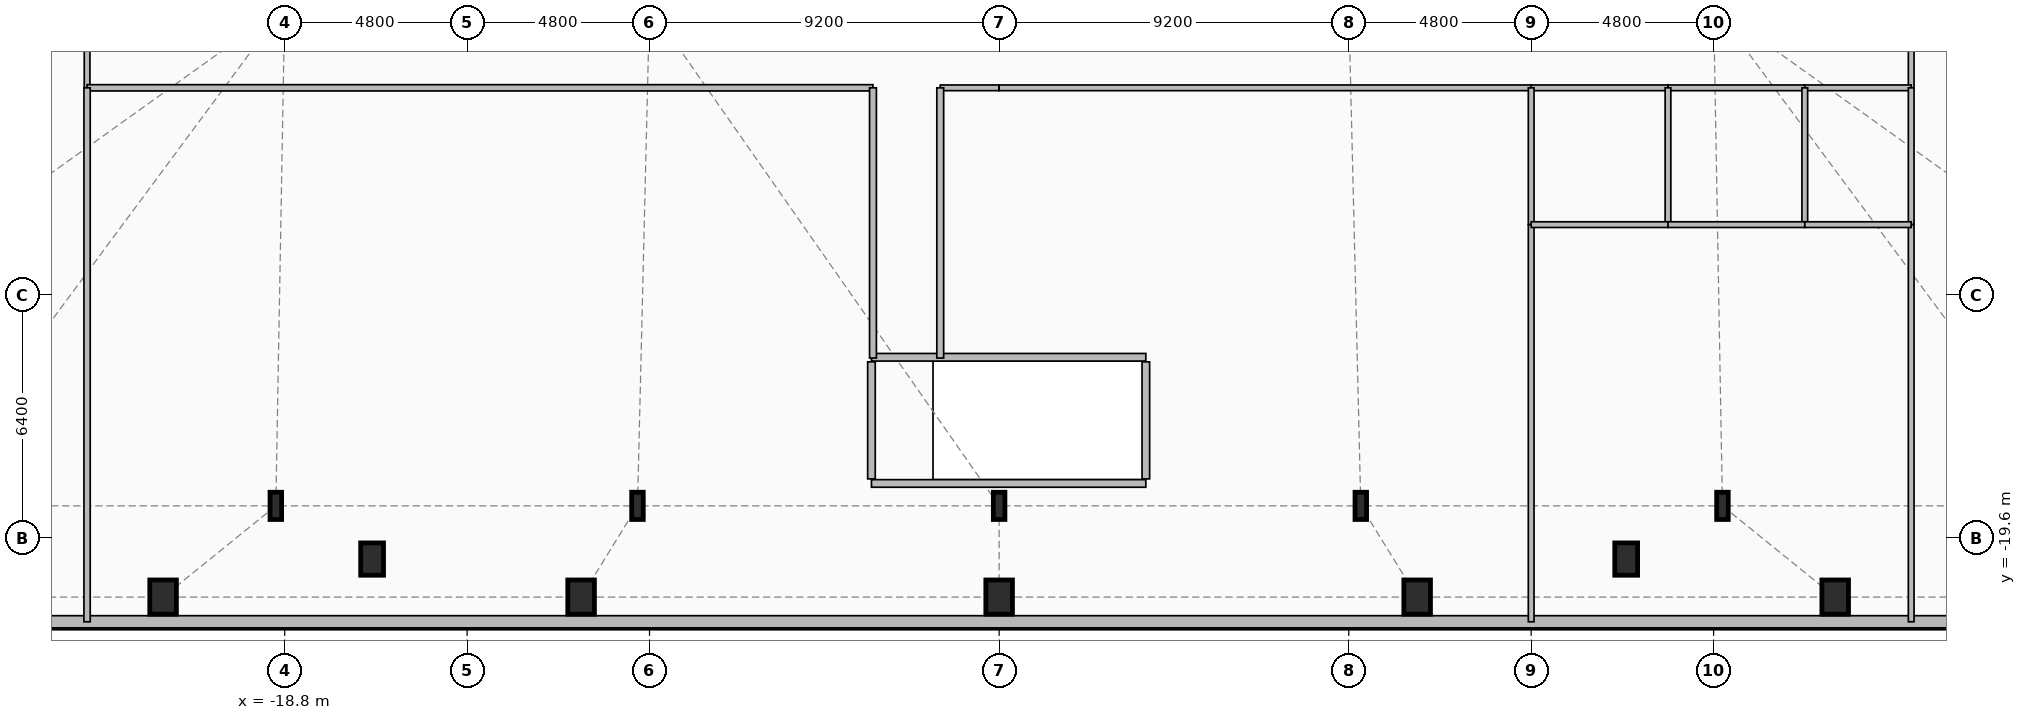
"""IFC4 building model, lengths in metres.
Left out: names, types, materials, properties, quantities, classifications, styles, units other than length and angle.
Written with IfcOpenShell. Run it as: python <this file> out.ifc"""

import sys

from ifc_helpers import new_model, si_unit, direction, frame, frame_2d, origin, origin_2d, place, context, subcontext, project, spatial, rectangle, i_section, extrude, element, fill, save


model = new_model("IFC4")
c1 = context("Model", 3, precision=1e-05, world=origin(), true_north=direction((0.0, 1.0)))
c2 = subcontext(c1, "Body", "Model", "MODEL_VIEW")
j1 = project(units=[si_unit("LENGTHUNIT", "METRE"), si_unit("PLANEANGLEUNIT", "RADIAN")], contexts=[c1])
p1 = place(None, origin())
s1 = spatial("IfcSite", under=j1, at=p1, CompositionType="ELEMENT")
p2 = place(p1, origin())
s2 = spatial("IfcBuilding", under=s1, at=p2, CompositionType="ELEMENT")
p3 = place(p2, frame((0.0, 0.0, 22.5)))
s3 = spatial("IfcBuildingStorey", under=s2, at=p3, CompositionType="ELEMENT", Elevation=22.5)
for number, where, z_axis, x_axis in (
    (1, (-22.0, -21.15, 0.0), (0.0, 0.0, 1.0), (1.0, 0.0, 0.0)),
    (2, (-11.0, -21.15, 0.0), (0.0, 0.0, 1.0), (1.0, 0.0, 0.0)),
    (3, (0.0, -21.15, 0.0), (0.0, 0.0, 1.0), (1.0, 0.0, 0.0)),
    (4, (11.0, -21.15, 0.0), (0.0, 0.0, 1.0), (1.0, 0.0, 0.0)),
    (5, (22.0, -21.15, 0.0), (0.0, 0.0, 1.0), (1.0, 0.0, 0.0)),
):
    element("IfcColumn", number, at=place(p3, frame(where, z_axis=z_axis, x_axis=x_axis)), inside=s3, PredefinedType="COLUMN", context=c2, shape_type="SweptSolid", body=[
        extrude(rectangle(XDim=0.7, YDim=0.9, at=origin_2d()), origin(), (0.0, 0.0, 1.0), 4.5),
    ])
for number, where, z_axis, x_axis in (
    (6, (-16.5, -20.15, 0.0), (0.0, 0.0, 1.0), (1.0, 0.0, 0.0)),
    (7, (16.5, -20.15, 0.0), (0.0, 0.0, 1.0), (1.0, 0.0, 0.0)),
):
    element("IfcColumn", number, at=place(p3, frame(where, z_axis=z_axis, x_axis=x_axis)), inside=s3, PredefinedType="PILASTER", context=c2, shape_type="SweptSolid", body=[
        extrude(rectangle(XDim=0.6, YDim=0.85, at=origin_2d()), origin(), (0.0, 0.0, 1.0), 4.5),
    ])
for number, where, z_axis, x_axis in (
    (8, (-19.033, -18.75, 0.0), (0.0, 0.0, 1.0), (1.0, 0.0, 0.0)),
    (9, (-9.517, -18.75, 0.0), (0.0, 0.0, 1.0), (1.0, 0.0, 0.0)),
    (10, (0.0, -18.75, 0.0), (0.0, 0.0, 1.0), (1.0, 0.0, 0.0)),
    (11, (9.517, -18.75, 0.0), (0.0, 0.0, 1.0), (1.0, 0.0, 0.0)),
    (12, (19.033, -18.75, 0.0), (0.0, 0.0, 1.0), (1.0, 0.0, 0.0)),
):
    element("IfcColumn", number, at=place(p3, frame(where, z_axis=z_axis, x_axis=x_axis)), inside=s3, PredefinedType="COLUMN", context=c2, shape_type="SweptSolid", body=[
        extrude(i_section(OverallWidth=0.304, OverallDepth=0.716, WebThickness=0.021, FlangeThickness=0.04, FilletRadius=0.027, at=origin_2d()), origin(), (0.0, 0.0, 1.0), 4.5),
    ])
p4 = place(p3, frame((36.8, -21.8, 0.0), z_axis=(0.0, 0.0, 1.0), x_axis=(-1.0, 0.0, 0.0)))
e13 = element("IfcWall", 13, at=p4, inside=s3, PredefinedType="SOLIDWALL", context=c2, shape_type="SweptSolid", body=[
    extrude(rectangle(XDim=73.6, YDim=0.32, at=frame_2d((36.8, 0.0))), origin(), (0.0, 0.0, 1.0), 4.16),
])
p5 = place(p4, frame((1.079, 0.0, 0.85)))
e14 = element("IfcOpeningElement", 14, at=p5, cuts=e13, PredefinedType="OPENING", context=c2, shape_type="SweptSolid", body=[
    extrude(rectangle(XDim=2.3, YDim=2.4, at=frame_2d((1.15, 1.2))), frame((0.0, 0.17, 0.0), z_axis=(0.0, -1.0, 0.0), x_axis=(1.0, 0.0, 0.0)), (0.0, 0.0, 1.0), 0.34),
])
p6 = place(p4, frame((8.431, 0.0, 0.85)))
e15 = element("IfcOpeningElement", 15, at=p6, cuts=e13, PredefinedType="OPENING", context=c2, shape_type="SweptSolid", body=[
    extrude(rectangle(XDim=2.6, YDim=2.4, at=frame_2d((1.3, 1.2))), frame((0.0, 0.17, 0.0), z_axis=(0.0, -1.0, 0.0), x_axis=(1.0, 0.0, 0.0)), (0.0, 0.0, 1.0), 0.34),
])
p7 = place(p4, frame((29.293, 0.0, 0.85)))
e16 = element("IfcOpeningElement", 16, at=p7, cuts=e13, PredefinedType="OPENING", context=c2, shape_type="SweptSolid", body=[
    extrude(rectangle(XDim=2.6, YDim=2.4, at=frame_2d((1.3, 1.2))), frame((0.0, 0.17, 0.0), z_axis=(0.0, -1.0, 0.0), x_axis=(1.0, 0.0, 0.0)), (0.0, 0.0, 1.0), 0.34),
])
p8 = place(p4, frame((49.195, 0.0, 0.85)))
e17 = element("IfcOpeningElement", 17, at=p8, cuts=e13, PredefinedType="OPENING", context=c2, shape_type="SweptSolid", body=[
    extrude(rectangle(XDim=2.6, YDim=2.4, at=frame_2d((1.3, 1.2))), frame((0.0, 0.17, 0.0), z_axis=(0.0, -1.0, 0.0), x_axis=(1.0, 0.0, 0.0)), (0.0, 0.0, 1.0), 0.34),
])
p9 = place(p4, frame((62.649, 0.0, 0.85)))
e18 = element("IfcOpeningElement", 18, at=p9, cuts=e13, PredefinedType="OPENING", context=c2, shape_type="SweptSolid", body=[
    extrude(rectangle(XDim=2.6, YDim=2.4, at=frame_2d((1.3, 1.2))), frame((0.0, 0.17, 0.0), z_axis=(0.0, -1.0, 0.0), x_axis=(1.0, 0.0, 0.0)), (0.0, 0.0, 1.0), 0.34),
])
p10 = place(p4, frame((70.301, 0.0, 0.85)))
e19 = element("IfcOpeningElement", 19, at=p10, cuts=e13, PredefinedType="OPENING", context=c2, shape_type="SweptSolid", body=[
    extrude(rectangle(XDim=2.3, YDim=2.4, at=frame_2d((1.15, 1.2))), frame((0.0, 0.17, 0.0), z_axis=(0.0, -1.0, 0.0), x_axis=(1.0, 0.0, 0.0)), (0.0, 0.0, 1.0), 0.34),
])
p11 = place(p3, frame((-3.36, -14.84, 0.0), z_axis=(0.0, 0.0, 1.0), x_axis=(1.0, 0.0, 0.0)))
e20 = element("IfcWall", 20, at=p11, inside=s3, PredefinedType="SHEAR", context=c2, shape_type="SweptSolid", body=[
    extrude(rectangle(XDim=7.22, YDim=0.2, at=frame_2d((3.61, 0.0))), origin(), (0.0, 0.0, 1.0), 4.16),
])
p12 = place(p11, frame((0.31, 0.0, 0.0)))
e21 = element("IfcOpeningElement", 21, at=p12, cuts=e20, PredefinedType="OPENING", context=c2, shape_type="SweptSolid", body=[
    extrude(rectangle(XDim=1.1, YDim=2.15, at=frame_2d((0.55, 1.075))), frame((0.0, 0.11, 0.0), z_axis=(0.0, -1.0, 0.0), x_axis=(1.0, 0.0, 0.0)), (0.0, 0.0, 1.0), 0.22),
])
p13 = place(p3, frame((-3.36, -18.16, 0.0), z_axis=(0.0, 0.0, 1.0), x_axis=(1.0, 0.0, 0.0)))
e22 = element("IfcWall", 22, at=p13, inside=s3, PredefinedType="SHEAR", context=c2, shape_type="SweptSolid", body=[
    extrude(rectangle(XDim=7.22, YDim=0.2, at=frame_2d((3.61, 0.0))), origin(), (0.0, 0.0, 1.0), 4.16),
])
for number, where, z_axis, x_axis in (
    (23, (-3.36, -18.04, 0.0), (0.0, 0.0, 1.0), (0.0, 1.0, 0.0)),
    (24, (3.86, -18.04, 0.0), (0.0, 0.0, 1.0), (0.0, 1.0, 0.0)),
):
    element("IfcWall", number, at=place(p3, frame(where, z_axis=z_axis, x_axis=x_axis)), inside=s3, PredefinedType="SHEAR", context=c2, shape_type="SweptSolid", body=[
        extrude(rectangle(XDim=3.08, YDim=0.2, at=frame_2d((1.54, 0.0))), origin(), (0.0, 0.0, 1.0), 4.16),
    ])
p14 = place(p3, frame((-24.0, -7.75, 0.0), z_axis=(0.0, 0.0, 1.0), x_axis=(0.0, 1.0, 0.0)))
e25 = element("IfcWall", 25, at=p14, inside=s3, PredefinedType="PARTITIONING", context=c2, shape_type="SweptSolid", body=[
    extrude(rectangle(XDim=2.15, YDim=0.15, at=frame_2d((1.075, 0.0))), origin(), (0.0, 0.0, 1.0), 4.16),
])
p15 = place(p14, frame((0.625, 0.0, 0.0)))
e26 = element("IfcOpeningElement", 26, at=p15, cuts=e25, PredefinedType="OPENING", context=c2, shape_type="SweptSolid", body=[
    extrude(rectangle(XDim=0.9, YDim=2.1, at=frame_2d((0.45, 1.05))), frame((0.0, 0.085, 0.0), z_axis=(0.0, -1.0, 0.0), x_axis=(1.0, 0.0, 0.0)), (0.0, 0.0, 1.0), 0.17),
])
p16 = place(p3, frame((-3.32, -7.75, 0.0), z_axis=(0.0, 0.0, 1.0), x_axis=(-1.0, 0.0, 0.0)))
e27 = element("IfcWall", 27, at=p16, inside=s3, PredefinedType="PARTITIONING", context=c2, shape_type="SweptSolid", body=[
    extrude(rectangle(XDim=20.68, YDim=0.165, at=frame_2d((10.34, 0.0))), origin(), (0.0, 0.0, 1.0), 4.16),
])
p17 = place(p16, frame((9.64, 0.0, 0.0)))
e28 = element("IfcOpeningElement", 28, at=p17, cuts=e27, PredefinedType="OPENING", context=c2, shape_type="SweptSolid", body=[
    extrude(rectangle(XDim=1.4, YDim=2.3, at=frame_2d((0.7, 1.15))), frame((0.0, 0.093, 0.0), z_axis=(0.0, -1.0, 0.0), x_axis=(1.0, 0.0, 0.0)), (0.0, 0.0, 1.0), 0.185),
])
p18 = place(p3, frame((0.0, -7.75, 0.0), z_axis=(0.0, 0.0, 1.0), x_axis=(-1.0, 0.0, 0.0)))
e29 = element("IfcWall", 29, at=p18, inside=s3, PredefinedType="PARTITIONING", context=c2, shape_type="SweptSolid", body=[
    extrude(rectangle(XDim=1.55, YDim=0.15, at=frame_2d((0.775, 0.0))), origin(), (0.0, 0.0, 1.0), 4.16),
])
p19 = place(p3, frame((24.0, -5.6, 0.0), z_axis=(0.0, 0.0, 1.0), x_axis=(0.0, -1.0, 0.0)))
e30 = element("IfcWall", 30, at=p19, inside=s3, PredefinedType="PARTITIONING", context=c2, shape_type="SweptSolid", body=[
    extrude(rectangle(XDim=2.15, YDim=0.15, at=frame_2d((1.075, 0.0))), origin(), (0.0, 0.0, 1.0), 4.16),
])
p20 = place(p19, frame((0.625, 0.0, 0.0)))
e31 = element("IfcOpeningElement", 31, at=p20, cuts=e30, PredefinedType="OPENING", context=c2, shape_type="SweptSolid", body=[
    extrude(rectangle(XDim=0.9, YDim=2.1, at=frame_2d((0.45, 1.05))), frame((0.0, 0.085, 0.0), z_axis=(0.0, -1.0, 0.0), x_axis=(1.0, 0.0, 0.0)), (0.0, 0.0, 1.0), 0.17),
])
p21 = place(p3, frame((14.0, -7.75, 0.0), z_axis=(0.0, 0.0, 1.0), x_axis=(-1.0, 0.0, 0.0)))
e32 = element("IfcWall", 32, at=p21, inside=s3, PredefinedType="PARTITIONING", context=c2, shape_type="SweptSolid", body=[
    extrude(rectangle(XDim=14.0, YDim=0.15, at=frame_2d((7.0, 0.0))), origin(), (0.0, 0.0, 1.0), 4.16),
])
p22 = place(p21, frame((10.59, 0.0, 0.0)))
e33 = element("IfcOpeningElement", 33, at=p22, cuts=e32, PredefinedType="OPENING", context=c2, shape_type="SweptSolid", body=[
    extrude(rectangle(XDim=1.4, YDim=2.3, at=frame_2d((0.7, 1.15))), frame((0.0, 0.085, 0.0), z_axis=(0.0, -1.0, 0.0), x_axis=(1.0, 0.0, 0.0)), (0.0, 0.0, 1.0), 0.17),
])
p23 = place(p3, frame((17.6, -7.75, 0.0), z_axis=(0.0, 0.0, 1.0), x_axis=(-1.0, 0.0, 0.0)))
e34 = element("IfcWall", 34, at=p23, inside=s3, PredefinedType="PLUMBINGWALL", context=c2, shape_type="SweptSolid", body=[
    extrude(rectangle(XDim=3.6, YDim=0.15, at=frame_2d((1.8, 0.0))), origin(), (0.0, 0.0, 1.0), 4.16),
])
p24 = place(p23, frame((1.927, 0.0, 0.0)))
e35 = element("IfcOpeningElement", 35, at=p24, cuts=e34, PredefinedType="OPENING", context=c2, shape_type="SweptSolid", body=[
    extrude(rectangle(XDim=0.9, YDim=2.1, at=frame_2d((0.45, 1.05))), frame((0.0, 0.085, 0.0), z_axis=(0.0, -1.0, 0.0), x_axis=(1.0, 0.0, 0.0)), (0.0, 0.0, 1.0), 0.17),
])
p25 = place(p3, frame((21.2, -7.75, 0.0), z_axis=(0.0, 0.0, 1.0), x_axis=(-1.0, 0.0, 0.0)))
e36 = element("IfcWall", 36, at=p25, inside=s3, PredefinedType="PLUMBINGWALL", context=c2, shape_type="SweptSolid", body=[
    extrude(rectangle(XDim=3.6, YDim=0.15, at=frame_2d((1.8, 0.0))), origin(), (0.0, 0.0, 1.0), 4.16),
])
p26 = place(p25, frame((0.772, 0.0, 0.0)))
e37 = element("IfcOpeningElement", 37, at=p26, cuts=e36, PredefinedType="OPENING", context=c2, shape_type="SweptSolid", body=[
    extrude(rectangle(XDim=0.9, YDim=2.1, at=frame_2d((0.45, 1.05))), frame((0.0, 0.085, 0.0), z_axis=(0.0, -1.0, 0.0), x_axis=(1.0, 0.0, 0.0)), (0.0, 0.0, 1.0), 0.17),
])
p27 = place(p3, frame((24.0, -7.75, 0.0), z_axis=(0.0, 0.0, 1.0), x_axis=(-1.0, 0.0, 0.0)))
e38 = element("IfcWall", 38, at=p27, inside=s3, PredefinedType="PARTITIONING", context=c2, shape_type="SweptSolid", body=[
    extrude(rectangle(XDim=2.8, YDim=0.15, at=frame_2d((1.4, 0.0))), origin(), (0.0, 0.0, 1.0), 4.16),
])
p28 = place(p27, frame((0.666, 0.0, 0.0)))
e39 = element("IfcOpeningElement", 39, at=p28, cuts=e38, PredefinedType="OPENING", context=c2, shape_type="SweptSolid", body=[
    extrude(rectangle(XDim=0.95, YDim=2.1, at=frame_2d((0.475, 1.05))), frame((0.0, 0.085, 0.0), z_axis=(0.0, -1.0, 0.0), x_axis=(1.0, 0.0, 0.0)), (0.0, 0.0, 1.0), 0.17),
])
for number, where, z_axis, x_axis in (
    (40, (-3.32, -14.86, 0.0), (0.0, 0.0, 1.0), (0.0, 1.0, 0.0)),
    (41, (-1.55, -7.75, 0.0), (0.0, 0.0, 1.0), (0.0, -1.0, 0.0)),
):
    element("IfcWall", number, at=place(p3, frame(where, z_axis=z_axis, x_axis=x_axis)), inside=s3, PredefinedType="PARTITIONING", context=c2, shape_type="SweptSolid", body=[
        extrude(rectangle(XDim=7.11, YDim=0.18, at=frame_2d((3.555, 0.0))), origin(), (0.0, 0.0, 1.0), 4.16),
    ])
p29 = place(p3, frame((-24.0, -7.75, 0.0), z_axis=(0.0, 0.0, 1.0), x_axis=(0.0, -1.0, 0.0)))
e42 = element("IfcWall", 42, at=p29, inside=s3, PredefinedType="PARTITIONING", context=c2, shape_type="SweptSolid", body=[
    extrude(rectangle(XDim=14.05, YDim=0.165, at=frame_2d((7.025, 0.0))), origin(), (0.0, 0.0, 1.0), 4.16),
])
p30 = place(p3, frame((24.0, -11.35, 0.0), z_axis=(0.0, 0.0, 1.0), x_axis=(0.0, 1.0, 0.0)))
e43 = element("IfcWall", 43, at=p30, inside=s3, PredefinedType="PARTITIONING", context=c2, shape_type="SweptSolid", body=[
    extrude(rectangle(XDim=3.6, YDim=0.15, at=frame_2d((1.8, 0.0))), origin(), (0.0, 0.0, 1.0), 4.16),
])
p31 = place(p3, frame((24.0, -21.8, 0.0), z_axis=(0.0, 0.0, 1.0), x_axis=(0.0, 1.0, 0.0)))
e44 = element("IfcWall", 44, at=p31, inside=s3, PredefinedType="PARTITIONING", context=c2, shape_type="SweptSolid", body=[
    extrude(rectangle(XDim=10.45, YDim=0.15, at=frame_2d((5.225, 0.0))), origin(), (0.0, 0.0, 1.0), 4.16),
])
p32 = place(p3, frame((14.0, -7.75, 0.0), z_axis=(0.0, 0.0, 1.0), x_axis=(0.0, -1.0, 0.0)))
e45 = element("IfcWall", 45, at=p32, inside=s3, PredefinedType="PLUMBINGWALL", context=c2, shape_type="SweptSolid", body=[
    extrude(rectangle(XDim=3.6, YDim=0.15, at=frame_2d((1.8, 0.0))), origin(), (0.0, 0.0, 1.0), 4.16),
])
p33 = place(p3, frame((14.0, -11.35, 0.0), z_axis=(0.0, 0.0, 1.0), x_axis=(0.0, -1.0, 0.0)))
e46 = element("IfcWall", 46, at=p33, inside=s3, PredefinedType="PARTITIONING", context=c2, shape_type="SweptSolid", body=[
    extrude(rectangle(XDim=10.45, YDim=0.15, at=frame_2d((5.225, 0.0))), origin(), (0.0, 0.0, 1.0), 4.16),
])
for number, where, z_axis, x_axis in (
    (47, (17.6, -7.75, 0.0), (0.0, 0.0, 1.0), (0.0, -1.0, 0.0)),
    (48, (17.6, -11.35, 0.0), (0.0, 0.0, 1.0), (-1.0, 0.0, 0.0)),
    (49, (21.2, -7.75, 0.0), (0.0, 0.0, 1.0), (0.0, -1.0, 0.0)),
):
    element("IfcWall", number, at=place(p3, frame(where, z_axis=z_axis, x_axis=x_axis)), inside=s3, PredefinedType="PLUMBINGWALL", context=c2, shape_type="SweptSolid", body=[
        extrude(rectangle(XDim=3.6, YDim=0.15, at=frame_2d((1.8, 0.0))), origin(), (0.0, 0.0, 1.0), 4.16),
    ])
p34 = place(p3, frame((21.2, -11.35, 0.0), z_axis=(0.0, 0.0, 1.0), x_axis=(-1.0, 0.0, 0.0)))
e50 = element("IfcWall", 50, at=p34, inside=s3, PredefinedType="PLUMBINGWALL", context=c2, shape_type="SweptSolid", body=[
    extrude(rectangle(XDim=3.6, YDim=0.15, at=frame_2d((1.8, 0.0))), origin(), (0.0, 0.0, 1.0), 4.16),
])
p35 = place(p3, frame((24.0, -11.35, 0.0), z_axis=(0.0, 0.0, 1.0), x_axis=(-1.0, 0.0, 0.0)))
e51 = element("IfcWall", 51, at=p35, inside=s3, PredefinedType="PARTITIONING", context=c2, shape_type="SweptSolid", body=[
    extrude(rectangle(XDim=2.8, YDim=0.15, at=frame_2d((1.4, 0.0))), origin(), (0.0, 0.0, 1.0), 4.16),
])
p36 = place(p35, frame((0.666, 0.0, 0.0)))
e52 = element("IfcOpeningElement", 52, at=p36, cuts=e51, PredefinedType="OPENING", context=c2, shape_type="SweptSolid", body=[
    extrude(rectangle(XDim=0.95, YDim=2.1, at=frame_2d((0.475, 1.05))), frame((0.0, 0.085, 0.0), z_axis=(0.0, -1.0, 0.0), x_axis=(1.0, 0.0, 0.0)), (0.0, 0.0, 1.0), 0.17),
])
p37 = place(p7, origin())
e53 = element("IfcWindow", 53, at=p37, inside=s3, PartitioningType="SINGLE_PANEL", PredefinedType="WINDOW", context=c2, shape_type="SweptSolid", body=[
    extrude(rectangle(XDim=2.6, YDim=2.4, at=frame_2d((1.3, 1.2))), frame((0.0, 0.03, 0.0), z_axis=(0.0, -1.0, 0.0), x_axis=(1.0, 0.0, 0.0)), (0.0, 0.0, 1.0), 0.06),
])
fill(e16, e53)
p38 = place(p8, origin())
e54 = element("IfcWindow", 54, at=p38, inside=s3, PartitioningType="SINGLE_PANEL", PredefinedType="WINDOW", context=c2, shape_type="SweptSolid", body=[
    extrude(rectangle(XDim=2.6, YDim=2.4, at=frame_2d((1.3, 1.2))), frame((0.0, 0.03, 0.0), z_axis=(0.0, -1.0, 0.0), x_axis=(1.0, 0.0, 0.0)), (0.0, 0.0, 1.0), 0.06),
])
fill(e17, e54)
p39 = place(p12, origin())
e55 = element("IfcDoor", 55, at=p39, inside=s3, OperationType="SINGLE_SWING_LEFT", PredefinedType="DOOR", context=c2, shape_type="SweptSolid", body=[
    extrude(rectangle(XDim=1.1, YDim=2.15, at=frame_2d((0.55, 1.075))), frame((0.0, 0.025, 0.0), z_axis=(0.0, -1.0, 0.0), x_axis=(1.0, 0.0, 0.0)), (0.0, 0.0, 1.0), 0.05),
])
fill(e21, e55)
p40 = place(p15, origin())
e56 = element("IfcDoor", 56, at=p40, inside=s3, OperationType="SINGLE_SWING_RIGHT", PredefinedType="DOOR", context=c2, shape_type="SweptSolid", body=[
    extrude(rectangle(XDim=0.9, YDim=2.1, at=frame_2d((0.45, 1.05))), frame((0.0, 0.025, 0.0), z_axis=(0.0, -1.0, 0.0), x_axis=(1.0, 0.0, 0.0)), (0.0, 0.0, 1.0), 0.05),
])
fill(e26, e56)
p41 = place(p17, origin())
e57 = element("IfcDoor", 57, at=p41, inside=s3, OperationType="SINGLE_SWING_LEFT", PredefinedType="DOOR", context=c2, shape_type="SweptSolid", body=[
    extrude(rectangle(XDim=1.4, YDim=2.3, at=frame_2d((0.7, 1.15))), frame((0.0, 0.025, 0.0), z_axis=(0.0, -1.0, 0.0), x_axis=(1.0, 0.0, 0.0)), (0.0, 0.0, 1.0), 0.05),
])
fill(e28, e57)
p42 = place(p20, origin())
e58 = element("IfcDoor", 58, at=p42, inside=s3, OperationType="SINGLE_SWING_RIGHT", PredefinedType="DOOR", context=c2, shape_type="SweptSolid", body=[
    extrude(rectangle(XDim=0.9, YDim=2.1, at=frame_2d((0.45, 1.05))), frame((0.0, 0.025, 0.0), z_axis=(0.0, -1.0, 0.0), x_axis=(1.0, 0.0, 0.0)), (0.0, 0.0, 1.0), 0.05),
])
fill(e31, e58)
p43 = place(p22, origin())
e59 = element("IfcDoor", 59, at=p43, inside=s3, OperationType="SINGLE_SWING_LEFT", PredefinedType="DOOR", context=c2, shape_type="SweptSolid", body=[
    extrude(rectangle(XDim=1.4, YDim=2.3, at=frame_2d((0.7, 1.15))), frame((0.0, 0.025, 0.0), z_axis=(0.0, -1.0, 0.0), x_axis=(1.0, 0.0, 0.0)), (0.0, 0.0, 1.0), 0.05),
])
fill(e33, e59)
p44 = place(p24, origin())
e60 = element("IfcDoor", 60, at=p44, inside=s3, OperationType="SINGLE_SWING_RIGHT", PredefinedType="DOOR", context=c2, shape_type="SweptSolid", body=[
    extrude(rectangle(XDim=0.9, YDim=2.1, at=frame_2d((0.45, 1.05))), frame((0.0, 0.025, 0.0), z_axis=(0.0, -1.0, 0.0), x_axis=(1.0, 0.0, 0.0)), (0.0, 0.0, 1.0), 0.05),
])
fill(e35, e60)
p45 = place(p26, origin())
e61 = element("IfcDoor", 61, at=p45, inside=s3, OperationType="SINGLE_SWING_LEFT", PredefinedType="DOOR", context=c2, shape_type="SweptSolid", body=[
    extrude(rectangle(XDim=0.9, YDim=2.1, at=frame_2d((0.45, 1.05))), frame((0.0, 0.025, 0.0), z_axis=(0.0, -1.0, 0.0), x_axis=(1.0, 0.0, 0.0)), (0.0, 0.0, 1.0), 0.05),
])
fill(e37, e61)
p46 = place(p28, origin())
e62 = element("IfcDoor", 62, at=p46, inside=s3, OperationType="SINGLE_SWING_RIGHT", PredefinedType="DOOR", context=c2, shape_type="SweptSolid", body=[
    extrude(rectangle(XDim=0.95, YDim=2.1, at=frame_2d((0.475, 1.05))), frame((0.0, 0.025, 0.0), z_axis=(0.0, -1.0, 0.0), x_axis=(1.0, 0.0, 0.0)), (0.0, 0.0, 1.0), 0.05),
])
fill(e39, e62)
p47 = place(p36, origin())
e63 = element("IfcDoor", 63, at=p47, inside=s3, OperationType="SINGLE_SWING_LEFT", PredefinedType="DOOR", context=c2, shape_type="SweptSolid", body=[
    extrude(rectangle(XDim=0.95, YDim=2.1, at=frame_2d((0.475, 1.05))), frame((0.0, 0.025, 0.0), z_axis=(0.0, -1.0, 0.0), x_axis=(1.0, 0.0, 0.0)), (0.0, 0.0, 1.0), 0.05),
])
fill(e52, e63)
save(model, sys.argv[1])
